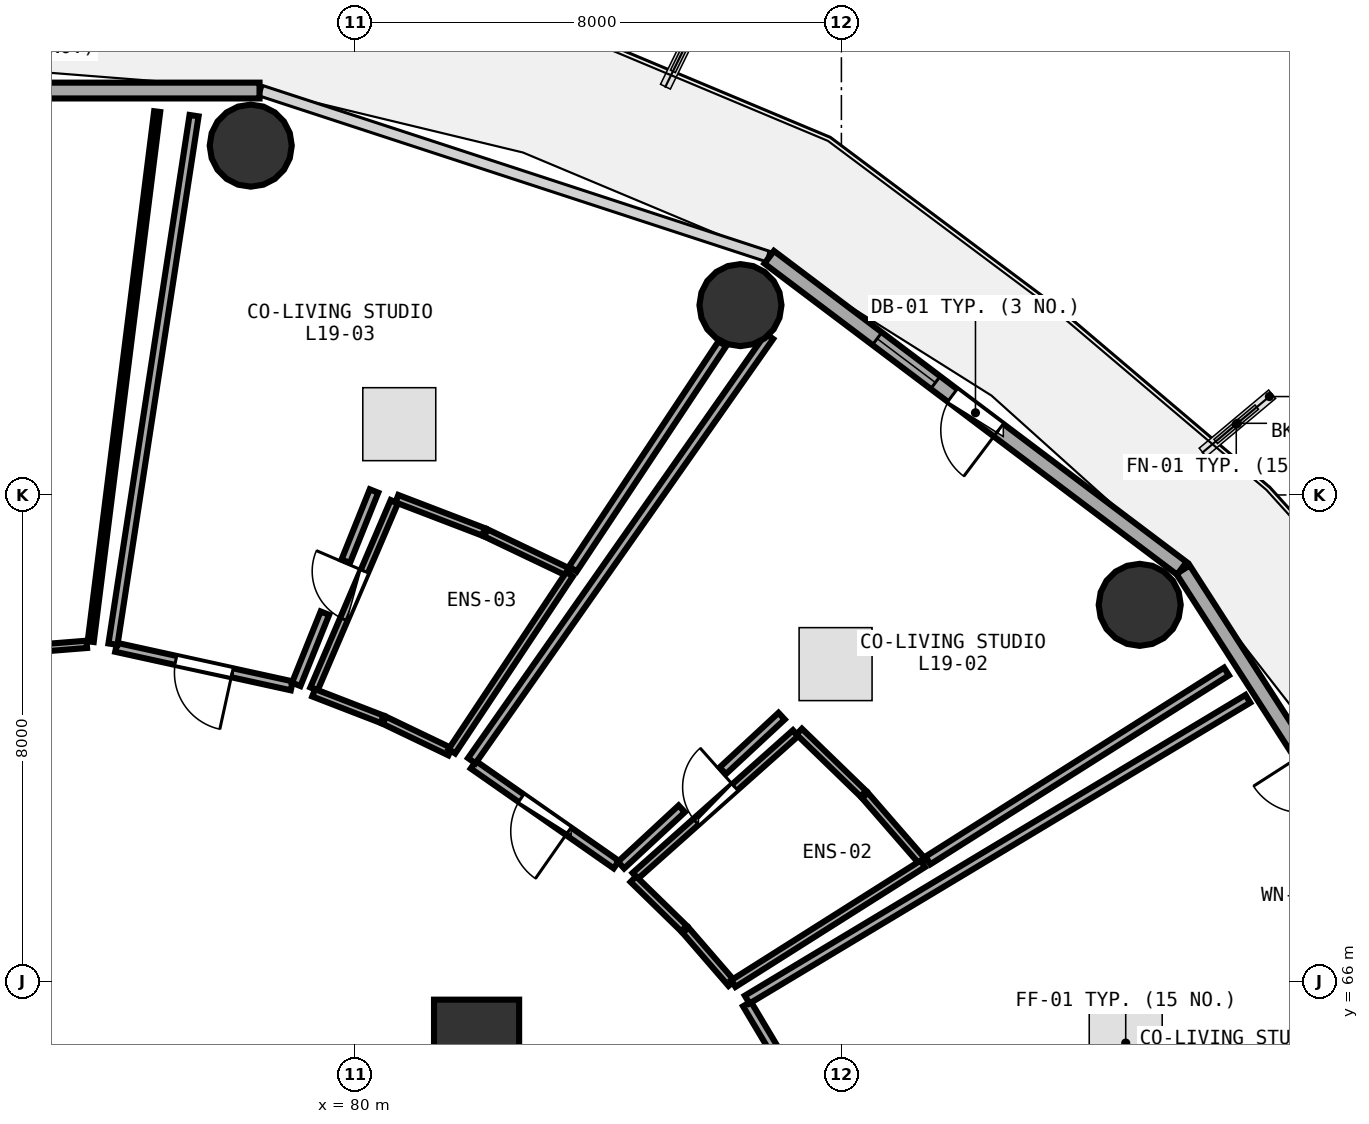
"""IFC4 building model, lengths in metres.
Left out: names, types, materials, properties, quantities, classifications, styles, units other than length and angle.
Written with IfcOpenShell. Run it as: python <this file> out.ifc"""

import sys

from ifc_helpers import new_model, si_unit, direction, frame, frame_2d, origin, origin_2d, place, context, subcontext, project, spatial, rectangle, circle, extrude, element, fill, save


model = new_model("IFC4")
c1 = context("Model", 3, precision=1e-05, world=origin(), true_north=direction((0.0, 1.0)))
c2 = subcontext(c1, "Body", "Model", "MODEL_VIEW")
j1 = project(units=[si_unit("LENGTHUNIT", "METRE"), si_unit("PLANEANGLEUNIT", "RADIAN")], contexts=[c1])
p1 = place(None, origin())
s1 = spatial("IfcSite", under=j1, at=p1, CompositionType="ELEMENT")
p2 = place(p1, origin())
s2 = spatial("IfcBuilding", under=s1, at=p2, CompositionType="ELEMENT")
p3 = place(p2, frame((0.0, 0.0, 76.35)))
s3 = spatial("IfcBuildingStorey", under=s2, at=p3, CompositionType="ELEMENT", Elevation=76.35)
p4 = place(p3, frame((82.0, 65.0, 0.0), z_axis=(0.0, 0.0, 1.0), x_axis=(1.0, 0.0, 0.0)))
e1 = element("IfcColumn", 1, at=p4, inside=s3, PredefinedType="PILASTER", context=c2, shape_type="SweptSolid", body=[
    extrude(rectangle(XDim=1.4, YDim=1.4, at=origin_2d()), origin(), (0.0, 0.0, 1.0), 3.75),
])
for number, where, z_axis, x_axis in (
    (2, (92.906, 72.193, 0.0), (0.0, 0.0, 1.0), (1.0, 0.0, 0.0)),
    (3, (86.34, 77.122, 0.0), (0.0, 0.0, 1.0), (1.0, 0.0, 0.0)),
    (4, (78.286, 79.745, 0.0), (0.0, 0.0, 1.0), (1.0, 0.0, 0.0)),
):
    element("IfcColumn", number, at=place(p3, frame(where, z_axis=z_axis, x_axis=x_axis)), inside=s3, PredefinedType="COLUMN", context=c2, shape_type="SweptSolid", body=[
        extrude(circle(Radius=0.675, at=origin_2d()), origin(), (0.0, 0.0, 1.0), 3.75),
    ])
p5 = place(p3, frame((98.048, 65.879, 0.0), z_axis=(0.0, 0.0, 1.0), x_axis=(-0.540620528459, 0.841266571432, 0.0)))
e5 = element("IfcWall", 5, at=p5, inside=s3, PredefinedType="SOLIDWALL", context=c2, shape_type="SweptSolid", body=[
    extrude(rectangle(XDim=8.193, YDim=0.26, at=frame_2d((4.096, 0.0))), origin(), (0.0, 0.0, 1.0), 3.475),
])
p6 = place(p5, frame((3.621, 0.0, 0.0)))
e6 = element("IfcOpeningElement", 6, at=p6, cuts=e5, PredefinedType="OPENING", context=c2, shape_type="SweptSolid", body=[
    extrude(rectangle(XDim=0.95, YDim=2.1, at=frame_2d((0.475, 1.05))), frame((0.0, 0.14, 0.0), z_axis=(0.0, -1.0, 0.0), x_axis=(1.0, 0.0, 0.0)), (0.0, 0.0, 1.0), 0.28),
])
p7 = place(p5, frame((2.041, 0.0, 0.85)))
e7 = element("IfcOpeningElement", 7, at=p7, cuts=e5, PredefinedType="OPENING", context=c2, shape_type="SweptSolid", body=[
    extrude(rectangle(XDim=1.2, YDim=1.45, at=frame_2d((0.6, 0.725))), frame((0.0, 0.14, 0.0), z_axis=(0.0, -1.0, 0.0), x_axis=(1.0, 0.0, 0.0)), (0.0, 0.0, 1.0), 0.28),
])
p8 = place(p3, frame((93.599, 72.793, 0.0), z_axis=(0.0, 0.0, 1.0), x_axis=(-0.798501507879, 0.601992808857, 0.0)))
e8 = element("IfcWall", 8, at=p8, inside=s3, PredefinedType="SOLIDWALL", context=c2, shape_type="SweptSolid", body=[
    extrude(rectangle(XDim=8.499, YDim=0.26, at=frame_2d((4.25, 0.0))), origin(), (0.0, 0.0, 1.0), 3.475),
])
p9 = place(p8, frame((3.775, 0.0, 0.0)))
e9 = element("IfcOpeningElement", 9, at=p9, cuts=e8, PredefinedType="OPENING", context=c2, shape_type="SweptSolid", body=[
    extrude(rectangle(XDim=0.95, YDim=2.1, at=frame_2d((0.475, 1.05))), frame((0.0, 0.14, 0.0), z_axis=(0.0, -1.0, 0.0), x_axis=(1.0, 0.0, 0.0)), (0.0, 0.0, 1.0), 0.28),
])
p10 = place(p8, frame((5.075, 0.0, 0.85)))
e10 = element("IfcOpeningElement", 10, at=p10, cuts=e8, PredefinedType="OPENING", context=c2, shape_type="SweptSolid", body=[
    extrude(rectangle(XDim=1.2, YDim=1.45, at=frame_2d((0.6, 0.725))), frame((0.0, 0.14, 0.0), z_axis=(0.0, -1.0, 0.0), x_axis=(1.0, 0.0, 0.0)), (0.0, 0.0, 1.0), 0.28),
])
p11 = place(p3, frame((78.43, 80.651, 0.0), z_axis=(0.0, 0.0, 1.0), x_axis=(-1.0, 0.0, 0.0)))
e11 = element("IfcWall", 11, at=p11, inside=s3, PredefinedType="SOLIDWALL", context=c2, shape_type="SweptSolid", body=[
    extrude(rectangle(XDim=8.861, YDim=0.26, at=frame_2d((4.43, 0.0))), origin(), (0.0, 0.0, 1.0), 3.475),
])
p12 = place(p11, frame((3.63, 0.0, 0.85)))
e12 = element("IfcOpeningElement", 12, at=p12, cuts=e11, PredefinedType="OPENING", context=c2, shape_type="SweptSolid", body=[
    extrude(rectangle(XDim=1.6, YDim=1.45, at=frame_2d((0.8, 0.725))), frame((0.0, 0.14, 0.0), z_axis=(0.0, -1.0, 0.0), x_axis=(1.0, 0.0, 0.0)), (0.0, 0.0, 1.0), 0.28),
])
p13 = place(p3, frame((87.856, 63.267, 0.0), z_axis=(0.0, 0.0, 1.0), x_axis=(-0.512288635556, 0.858813340535, 0.0)))
e13 = element("IfcWall", 13, at=p13, inside=s3, PredefinedType="PARTITIONING", context=c2, shape_type="SweptSolid", body=[
    extrude(rectangle(XDim=2.751, YDim=0.15, at=frame_2d((1.375, 0.0))), origin(), (0.0, 0.0, 1.0), 2.925),
])
p14 = place(p13, frame((0.901, 0.0, 0.0)))
e14 = element("IfcOpeningElement", 14, at=p14, cuts=e13, PredefinedType="OPENING", context=c2, shape_type="SweptSolid", body=[
    extrude(rectangle(XDim=0.95, YDim=2.08, at=frame_2d((0.475, 1.04))), frame((0.0, 0.085, 0.0), z_axis=(0.0, -1.0, 0.0), x_axis=(1.0, 0.0, 0.0)), (0.0, 0.0, 1.0), 0.17),
])
p15 = place(p3, frame((84.609, 67.736, 0.0), z_axis=(0.0, 0.0, 1.0), x_axis=(0.746989483068, 0.664835853565, 0.0)))
e15 = element("IfcWall", 15, at=p15, inside=s3, PredefinedType="PLUMBINGWALL", context=c2, shape_type="SweptSolid", body=[
    extrude(rectangle(XDim=3.531, YDim=0.13, at=frame_2d((1.765, 0.0))), origin(), (0.0, 0.0, 1.0), 3.175),
])
p16 = place(p15, frame((1.335, 0.0, 0.0)))
e16 = element("IfcOpeningElement", 16, at=p16, cuts=e15, PredefinedType="OPENING", context=c2, shape_type="SweptSolid", body=[
    extrude(rectangle(XDim=0.86, YDim=2.05, at=frame_2d((0.43, 1.025))), frame((0.0, 0.075, 0.0), z_axis=(0.0, -1.0, 0.0), x_axis=(1.0, 0.0, 0.0)), (0.0, 0.0, 1.0), 0.15),
])
p17 = place(p3, frame((84.298, 67.92, 0.0), z_axis=(0.0, 0.0, 1.0), x_axis=(-0.819775565256, 0.572684924378, 0.0)))
e17 = element("IfcWall", 17, at=p17, inside=s3, PredefinedType="PARTITIONING", context=c2, shape_type="SweptSolid", body=[
    extrude(rectangle(XDim=2.867, YDim=0.15, at=frame_2d((1.434, 0.0))), origin(), (0.0, 0.0, 1.0), 2.925),
])
p18 = place(p17, frame((0.959, 0.0, 0.0)))
e18 = element("IfcOpeningElement", 18, at=p18, cuts=e17, PredefinedType="OPENING", context=c2, shape_type="SweptSolid", body=[
    extrude(rectangle(XDim=0.95, YDim=2.08, at=frame_2d((0.475, 1.04))), frame((0.0, 0.085, 0.0), z_axis=(0.0, -1.0, 0.0), x_axis=(1.0, 0.0, 0.0)), (0.0, 0.0, 1.0), 0.17),
])
p19 = place(p3, frame((79.326, 70.809, 0.0), z_axis=(0.0, 0.0, 1.0), x_axis=(0.394174106006, 0.919035785024, 0.0)))
e19 = element("IfcWall", 19, at=p19, inside=s3, PredefinedType="PLUMBINGWALL", context=c2, shape_type="SweptSolid", body=[
    extrude(rectangle(XDim=3.353, YDim=0.13, at=frame_2d((1.677, 0.0))), origin(), (0.0, 0.0, 1.0), 2.925),
])
p20 = place(p19, frame((1.247, 0.0, 0.0)))
e20 = element("IfcOpeningElement", 20, at=p20, cuts=e19, PredefinedType="OPENING", context=c2, shape_type="SweptSolid", body=[
    extrude(rectangle(XDim=0.86, YDim=2.05, at=frame_2d((0.43, 1.025))), frame((0.0, 0.075, 0.0), z_axis=(0.0, -1.0, 0.0), x_axis=(1.0, 0.0, 0.0)), (0.0, 0.0, 1.0), 0.15),
])
p21 = place(p3, frame((78.96, 70.861, 0.0), z_axis=(0.0, 0.0, 1.0), x_axis=(-0.976789452363, 0.214201694093, 0.0)))
e21 = element("IfcWall", 21, at=p21, inside=s3, PredefinedType="PARTITIONING", context=c2, shape_type="SweptSolid", body=[
    extrude(rectangle(XDim=2.957, YDim=0.15, at=frame_2d((1.478, 0.0))), origin(), (0.0, 0.0, 1.0), 3.48),
])
p22 = place(p21, frame((1.003, 0.0, 0.0)))
e22 = element("IfcOpeningElement", 22, at=p22, cuts=e21, PredefinedType="OPENING", context=c2, shape_type="SweptSolid", body=[
    extrude(rectangle(XDim=0.95, YDim=2.08, at=frame_2d((0.475, 1.04))), frame((0.0, 0.085, 0.0), z_axis=(0.0, -1.0, 0.0), x_axis=(1.0, 0.0, 0.0)), (0.0, 0.0, 1.0), 0.17),
])
p23 = place(p3, frame((75.589, 71.543, 0.0), z_axis=(0.0, 0.0, 1.0), x_axis=(-0.996863165686, -0.079144354814, 0.0)))
e23 = element("IfcWall", 23, at=p23, inside=s3, PredefinedType="PARTITIONING", context=c2, shape_type="SweptSolid", body=[
    extrude(rectangle(XDim=5.765, YDim=0.12, at=frame_2d((2.883, 0.0))), origin(), (0.0, 0.0, 1.0), 2.925),
])
p24 = place(p23, frame((2.433, 0.0, 0.0)))
e24 = element("IfcOpeningElement", 24, at=p24, cuts=e23, PredefinedType="OPENING", context=c2, shape_type="SweptSolid", body=[
    extrude(rectangle(XDim=0.9, YDim=2.08, at=frame_2d((0.45, 1.04))), frame((0.0, 0.07, 0.0), z_axis=(0.0, -1.0, 0.0), x_axis=(1.0, 0.0, 0.0)), (0.0, 0.0, 1.0), 0.14),
])
p25 = place(p3, frame((86.45, 65.702, 0.0), z_axis=(0.0, 0.0, 1.0), x_axis=(0.857261851198, 0.514880683731, 0.0)))
e25 = element("IfcWall", 25, at=p25, inside=s3, PredefinedType="PARTITIONING", context=c2, shape_type="SweptSolid", body=[
    extrude(rectangle(XDim=9.606, YDim=0.15, at=frame_2d((4.803, 0.0))), origin(), (0.0, 0.0, 1.0), 2.975),
])
p26 = place(p3, frame((86.193, 65.969, 0.0), z_axis=(0.0, 0.0, 1.0), x_axis=(-0.654583900851, 0.755989362853, 0.0)))
e26 = element("IfcWall", 26, at=p26, inside=s3, PredefinedType="PLUMBINGWALL", context=c2, shape_type="SweptSolid", body=[
    extrude(rectangle(XDim=1.153, YDim=0.13, at=frame_2d((0.577, 0.0))), origin(), (0.0, 0.0, 1.0), 3.48),
])
p27 = place(p3, frame((85.411, 66.87, 0.0), z_axis=(0.0, 0.0, 1.0), x_axis=(-0.715871547002, 0.698232001696, 0.0)))
e27 = element("IfcWall", 27, at=p27, inside=s3, PredefinedType="PLUMBINGWALL", context=c2, shape_type="SweptSolid", body=[
    extrude(rectangle(XDim=1.163, YDim=0.13, at=frame_2d((0.581, 0.0))), origin(), (0.0, 0.0, 1.0), 2.925),
])
p28 = place(p3, frame((87.305, 70.109, 0.0), z_axis=(0.0, 0.0, 1.0), x_axis=(0.718235032224, -0.69580057379, 0.0)))
e28 = element("IfcWall", 28, at=p28, inside=s3, PredefinedType="PLUMBINGWALL", context=c2, shape_type="SweptSolid", body=[
    extrude(rectangle(XDim=1.469, YDim=0.13, at=frame_2d((0.735, 0.0))), origin(), (0.0, 0.0, 1.0), 2.925),
])
p29 = place(p3, frame((88.388, 69.058, 0.0), z_axis=(0.0, 0.0, 1.0), x_axis=(0.656315808405, -0.754486288568, 0.0)))
e29 = element("IfcWall", 29, at=p29, inside=s3, PredefinedType="PLUMBINGWALL", context=c2, shape_type="SweptSolid", body=[
    extrude(rectangle(XDim=1.455, YDim=0.13, at=frame_2d((0.728, 0.0))), origin(), (0.0, 0.0, 1.0), 2.925),
])
p30 = place(p3, frame((89.339, 67.934, 0.0), z_axis=(0.0, 0.0, 1.0), x_axis=(-0.845293712827, -0.53430191751, 0.0)))
e30 = element("IfcWall", 30, at=p30, inside=s3, PredefinedType="PLUMBINGWALL", context=c2, shape_type="SweptSolid", body=[
    extrude(rectangle(XDim=3.687, YDim=0.13, at=frame_2d((1.843, 0.0))), origin(), (0.0, 0.0, 1.0), 3.175),
])
p31 = place(p3, frame((81.921, 69.63, 0.0), z_axis=(0.0, 0.0, 1.0), x_axis=(0.574246298275, 0.818682593511, 0.0)))
e31 = element("IfcWall", 31, at=p31, inside=s3, PredefinedType="PARTITIONING", context=c2, shape_type="SweptSolid", body=[
    extrude(rectangle(XDim=8.525, YDim=0.15, at=frame_2d((4.262, 0.0))), origin(), (0.0, 0.0, 1.0), 2.925),
])
p32 = place(p3, frame((94.333, 71.097, 0.0), z_axis=(0.0, 0.0, 1.0), x_axis=(-0.845032344767, -0.534715191759, 0.0)))
e32 = element("IfcWall", 32, at=p32, inside=s3, PredefinedType="PARTITIONING", context=c2, shape_type="SweptSolid", body=[
    extrude(rectangle(XDim=5.811, YDim=0.15, at=frame_2d((2.905, 0.0))), origin(), (0.0, 0.0, 1.0), 2.975),
])
p33 = place(p3, frame((87.017, 70.363, 0.0), z_axis=(0.0, 0.0, 1.0), x_axis=(-0.733142432265, -0.680075123801, 0.0)))
e33 = element("IfcWall", 33, at=p33, inside=s3, PredefinedType="PARTITIONING", context=c2, shape_type="SweptSolid", body=[
    extrude(rectangle(XDim=1.32, YDim=0.15, at=frame_2d((0.66, 0.0))), origin(), (0.0, 0.0, 1.0), 3.175),
])
p34 = place(p3, frame((85.374, 68.839, 0.0), z_axis=(0.0, 0.0, 1.0), x_axis=(-0.733068131904, -0.680155213159, 0.0)))
e34 = element("IfcWall", 34, at=p34, inside=s3, PredefinedType="PARTITIONING", context=c2, shape_type="SweptSolid", body=[
    extrude(rectangle(XDim=1.361, YDim=0.15, at=frame_2d((0.681, 0.0))), origin(), (0.0, 0.0, 1.0), 3.235),
])
p35 = place(p3, frame((81.565, 69.777, 0.0), z_axis=(0.0, 0.0, 1.0), x_axis=(-0.901710288712, 0.432340785991, 0.0)))
e35 = element("IfcWall", 35, at=p35, inside=s3, PredefinedType="PLUMBINGWALL", context=c2, shape_type="SweptSolid", body=[
    extrude(rectangle(XDim=1.2, YDim=0.13, at=frame_2d((0.6, 0.0))), origin(), (0.0, 0.0, 1.0), 2.925),
])
p36 = place(p3, frame((80.446, 70.311, 0.0), z_axis=(0.0, 0.0, 1.0), x_axis=(-0.932603244632, 0.360903294669, 0.0)))
e36 = element("IfcWall", 36, at=p36, inside=s3, PredefinedType="PLUMBINGWALL", context=c2, shape_type="SweptSolid", body=[
    extrude(rectangle(XDim=1.207, YDim=0.13, at=frame_2d((0.604, 0.0))), origin(), (0.0, 0.0, 1.0), 3.235),
])
p37 = place(p3, frame((80.69, 73.939, 0.0), z_axis=(0.0, 0.0, 1.0), x_axis=(0.933707809738, -0.358035928413, 0.0)))
e37 = element("IfcWall", 37, at=p37, inside=s3, PredefinedType="PLUMBINGWALL", context=c2, shape_type="SweptSolid", body=[
    extrude(rectangle(XDim=1.527, YDim=0.13, at=frame_2d((0.763, 0.0))), origin(), (0.0, 0.0, 1.0), 3.48),
])
p38 = place(p3, frame((82.152, 73.376, 0.0), z_axis=(0.0, 0.0, 1.0), x_axis=(0.902598876691, -0.430482598714, 0.0)))
e38 = element("IfcWall", 38, at=p38, inside=s3, PredefinedType="PLUMBINGWALL", context=c2, shape_type="SweptSolid", body=[
    extrude(rectangle(XDim=1.519, YDim=0.13, at=frame_2d((0.759, 0.0))), origin(), (0.0, 0.0, 1.0), 3.175),
])
p39 = place(p3, frame((83.53, 72.697, 0.0), z_axis=(0.0, 0.0, 1.0), x_axis=(-0.553523611894, -0.832833483402, 0.0)))
e39 = element("IfcWall", 39, at=p39, inside=s3, PredefinedType="PLUMBINGWALL", context=c2, shape_type="SweptSolid", body=[
    extrude(rectangle(XDim=3.497, YDim=0.13, at=frame_2d((1.749, 0.0))), origin(), (0.0, 0.0, 1.0), 3.175),
])
p40 = place(p3, frame((76.02, 71.546, 0.0), z_axis=(0.0, 0.0, 1.0), x_axis=(0.151710828081, 0.988424921096, 0.0)))
e40 = element("IfcWall", 40, at=p40, inside=s3, PredefinedType="PARTITIONING", context=c2, shape_type="SweptSolid", body=[
    extrude(rectangle(XDim=8.793, YDim=0.15, at=frame_2d((4.396, 0.0))), origin(), (0.0, 0.0, 1.0), 2.975),
])
p41 = place(p3, frame((86.043, 76.488, 0.0), z_axis=(0.0, 0.0, 1.0), x_axis=(-0.553014365691, -0.833171717799, 0.0)))
e41 = element("IfcWall", 41, at=p41, inside=s3, PredefinedType="PARTITIONING", context=c2, shape_type="SweptSolid", body=[
    extrude(rectangle(XDim=4.448, YDim=0.15, at=frame_2d((2.224, 0.0))), origin(), (0.0, 0.0, 1.0), 2.925),
])
p42 = place(p3, frame((80.313, 74.065, 0.0), z_axis=(0.0, 0.0, 1.0), x_axis=(-0.373249856729, -0.927730857766, 0.0)))
e42 = element("IfcWall", 42, at=p42, inside=s3, PredefinedType="PARTITIONING", context=c2, shape_type="SweptSolid", body=[
    extrude(rectangle(XDim=1.245, YDim=0.15, at=frame_2d((0.622, 0.0))), origin(), (0.0, 0.0, 1.0), 2.925),
])
p43 = place(p3, frame((79.505, 72.056, 0.0), z_axis=(0.0, 0.0, 1.0), x_axis=(-0.373190252803, -0.927754835726, 0.0)))
e43 = element("IfcWall", 43, at=p43, inside=s3, PredefinedType="PARTITIONING", context=c2, shape_type="SweptSolid", body=[
    extrude(rectangle(XDim=1.263, YDim=0.15, at=frame_2d((0.631, 0.0))), origin(), (0.0, 0.0, 1.0), 3.48),
])
p44 = place(p3, frame((76.747, 80.304, 0.0), z_axis=(0.0, 0.0, 1.0), x_axis=(-0.124421236745, -0.992229487491, 0.0)))
e44 = element("IfcWall", 44, at=p44, inside=s3, PredefinedType="PARTITIONING", context=c2, shape_type="SweptSolid", body=[
    extrude(rectangle(XDim=8.785, YDim=0.1, at=frame_2d((4.393, 0.0))), origin(), (0.0, 0.0, 1.0), 2.975),
])
p45 = place(p9, frame((0.95, 0.0, 0.0), z_axis=(0.0, 0.0, 1.0), x_axis=(-1.0, 0.0, 0.0)))
e45 = element("IfcDoor", 45, at=p45, inside=s3, OperationType="SINGLE_SWING_RIGHT", PredefinedType="DOOR", context=c2, shape_type="SweptSolid", body=[
    extrude(rectangle(XDim=0.95, YDim=2.1, at=frame_2d((0.475, 1.05))), frame((0.0, 0.025, 0.0), z_axis=(0.0, -1.0, 0.0), x_axis=(1.0, 0.0, 0.0)), (0.0, 0.0, 1.0), 0.05),
])
fill(e9, e45)
p46 = place(p10, origin())
e46 = element("IfcWindow", 46, at=p46, inside=s3, PartitioningType="SINGLE_PANEL", PredefinedType="WINDOW", context=c2, shape_type="SweptSolid", body=[
    extrude(rectangle(XDim=1.2, YDim=1.45, at=frame_2d((0.6, 0.725))), frame((0.0, 0.03, 0.0), z_axis=(0.0, -1.0, 0.0), x_axis=(1.0, 0.0, 0.0)), (0.0, 0.0, 1.0), 0.06),
])
fill(e10, e46)
p47 = place(p16, origin())
e47 = element("IfcDoor", 47, at=p47, inside=s3, OperationType="SINGLE_SWING_RIGHT", PredefinedType="DOOR", context=c2, shape_type="SweptSolid", body=[
    extrude(rectangle(XDim=0.86, YDim=2.05, at=frame_2d((0.43, 1.025))), frame((0.0, 0.025, 0.0), z_axis=(0.0, -1.0, 0.0), x_axis=(1.0, 0.0, 0.0)), (0.0, 0.0, 1.0), 0.05),
])
fill(e16, e47)
p48 = place(p18, origin())
e48 = element("IfcDoor", 48, at=p48, inside=s3, OperationType="SINGLE_SWING_LEFT", PredefinedType="DOOR", context=c2, shape_type="SweptSolid", body=[
    extrude(rectangle(XDim=0.95, YDim=2.08, at=frame_2d((0.475, 1.04))), frame((0.0, 0.025, 0.0), z_axis=(0.0, -1.0, 0.0), x_axis=(1.0, 0.0, 0.0)), (0.0, 0.0, 1.0), 0.05),
])
fill(e18, e48)
p49 = place(p20, origin())
e49 = element("IfcDoor", 49, at=p49, inside=s3, OperationType="SINGLE_SWING_RIGHT", PredefinedType="DOOR", context=c2, shape_type="SweptSolid", body=[
    extrude(rectangle(XDim=0.86, YDim=2.05, at=frame_2d((0.43, 1.025))), frame((0.0, 0.025, 0.0), z_axis=(0.0, -1.0, 0.0), x_axis=(1.0, 0.0, 0.0)), (0.0, 0.0, 1.0), 0.05),
])
fill(e20, e49)
p50 = place(p22, origin())
e50 = element("IfcDoor", 50, at=p50, inside=s3, OperationType="SINGLE_SWING_LEFT", PredefinedType="DOOR", context=c2, shape_type="SweptSolid", body=[
    extrude(rectangle(XDim=0.95, YDim=2.08, at=frame_2d((0.475, 1.04))), frame((0.0, 0.025, 0.0), z_axis=(0.0, -1.0, 0.0), x_axis=(1.0, 0.0, 0.0)), (0.0, 0.0, 1.0), 0.05),
])
fill(e22, e50)
save(model, sys.argv[1])
